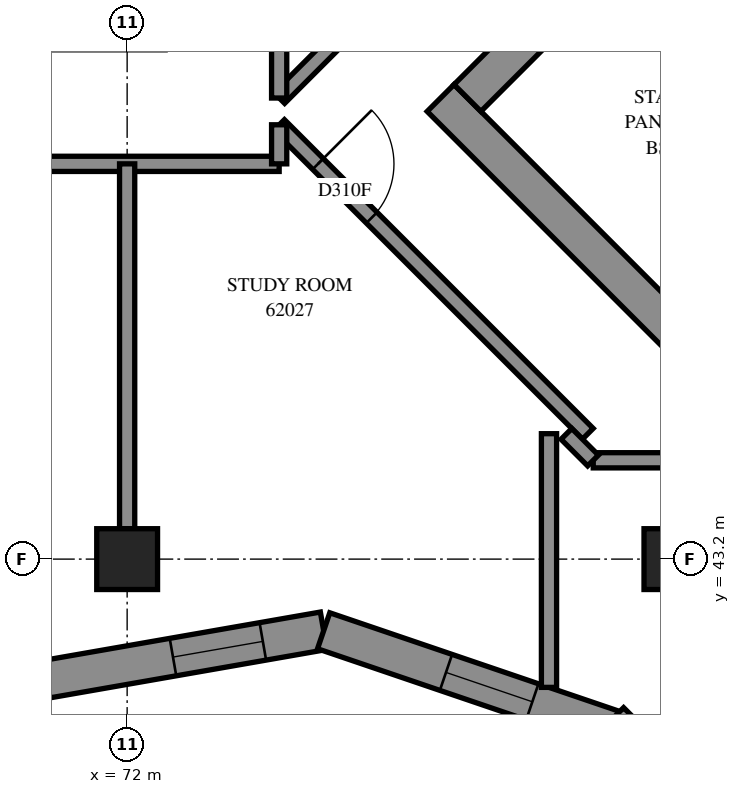
"""IFC4 building model, lengths in metres.
Left out: names, types, materials, properties, quantities, classifications, styles, units other than length and angle.
Written with IfcOpenShell. Run it as: python <this file> out.ifc"""

import sys

from ifc_helpers import new_model, si_unit, direction, frame, frame_2d, origin, origin_2d, place, context, subcontext, project, spatial, polyline, rectangle, outline, extrude, element, fill, save


model = new_model("IFC4")
c1 = context("Model", 3, precision=1e-05, world=origin(), true_north=direction((0.0, 1.0)))
c2 = subcontext(c1, "Body", "Model", "MODEL_VIEW")
j1 = project(units=[si_unit("LENGTHUNIT", "METRE"), si_unit("PLANEANGLEUNIT", "RADIAN")], contexts=[c1])
p1 = place(None, origin())
s1 = spatial("IfcSite", under=j1, at=p1, CompositionType="ELEMENT")
p2 = place(p1, origin())
s2 = spatial("IfcBuilding", under=s1, at=p2, CompositionType="ELEMENT")
p3 = place(p2, frame((0.0, 0.0, 227.0)))
s3 = spatial("IfcBuildingStorey", under=s2, at=p3, CompositionType="ELEMENT", Elevation=227.0)
for number, where, z_axis, x_axis in (
    (1, (72.0, 43.2, 0.0), (0.0, 0.0, 1.0), (1.0, 0.0, 0.0)),
    (2, (79.2, 43.2, 0.0), (0.0, 0.0, 1.0), (1.0, 0.0, 0.0)),
):
    element("IfcColumn", number, at=place(p3, frame(where, z_axis=z_axis, x_axis=x_axis)), inside=s3, PredefinedType="COLUMN", context=c2, shape_type="SweptSolid", body=[
        extrude(rectangle(XDim=0.8, YDim=0.8, at=origin_2d()), origin(), (0.0, 0.0, 1.0), 3.1),
    ])
p4 = place(p3, frame((76.124, 49.267, -0.3), z_axis=(0.0, 0.0, 1.0), x_axis=(0.7071067812, -0.7071067812, 0.0)))
e3 = element("IfcWall", 3, at=p4, inside=s3, PredefinedType="SHEAR", context=c2, shape_type="SweptSolid", body=[
    extrude(rectangle(XDim=15.4, YDim=0.5, at=frame_2d((7.7, 0.0))), origin(), (0.0, 0.0, 1.0), 2.7),
])
p5 = place(p3, frame((76.478, 49.267, -0.3), z_axis=(0.0, 0.0, 1.0), x_axis=(0.7071067812, 0.7071067812, 0.0)))
e4 = element("IfcWall", 4, at=p5, inside=s3, PredefinedType="SHEAR", context=c2, shape_type="SweptSolid", body=[
    extrude(rectangle(XDim=14.4, YDim=0.5, at=frame_2d((7.2, 0.0))), origin(), (0.0, 0.0, 1.0), 2.7),
])
p6 = place(p5, frame((4.55, 0.0, 0.3)))
e5 = element("IfcOpeningElement", 5, at=p6, cuts=e4, PredefinedType="OPENING", context=c2, shape_type="SweptSolid", body=[
    extrude(rectangle(XDim=1.1, YDim=2.1, at=frame_2d((0.55, 1.05))), frame((0.0, 0.26, 0.0), z_axis=(0.0, -1.0, 0.0), x_axis=(1.0, 0.0, 0.0)), (0.0, 0.0, 1.0), 0.52),
])
p7 = place(p5, frame((11.35, 0.0, 0.3)))
e6 = element("IfcOpeningElement", 6, at=p7, cuts=e4, PredefinedType="OPENING", context=c2, shape_type="SweptSolid", body=[
    extrude(rectangle(XDim=1.1, YDim=2.1, at=frame_2d((0.55, 1.05))), frame((0.0, 0.26, 0.0), z_axis=(0.0, -1.0, 0.0), x_axis=(1.0, 0.0, 0.0)), (0.0, 0.0, 1.0), 0.52),
])
p8 = place(p3, frame((78.988, 51.423, 0.0), z_axis=(0.0, 0.0, 1.0), x_axis=(0.7071067812, -0.7071067812, 0.0)))
e7 = element("IfcWall", 7, at=p8, inside=s3, PredefinedType="SOLIDWALL", context=c2, shape_type="SweptSolid", body=[
    extrude(rectangle(XDim=14.4, YDim=0.3, at=frame_2d((7.2, 0.0))), origin(), (0.0, 0.0, 1.0), 3.1),
])
p9 = place(p8, frame((1.35, 0.0, 0.0)))
e8 = element("IfcOpeningElement", 8, at=p9, cuts=e7, PredefinedType="OPENING", context=c2, shape_type="SweptSolid", body=[
    extrude(rectangle(XDim=0.9, YDim=2.1, at=frame_2d((0.45, 1.05))), frame((0.0, 0.16, 0.0), z_axis=(0.0, -1.0, 0.0), x_axis=(1.0, 0.0, 0.0)), (0.0, 0.0, 1.0), 0.32),
])
p10 = place(p8, frame((4.95, 0.0, 0.0)))
e9 = element("IfcOpeningElement", 9, at=p10, cuts=e7, PredefinedType="OPENING", context=c2, shape_type="SweptSolid", body=[
    extrude(rectangle(XDim=0.9, YDim=2.1, at=frame_2d((0.45, 1.05))), frame((0.0, 0.16, 0.0), z_axis=(0.0, -1.0, 0.0), x_axis=(1.0, 0.0, 0.0)), (0.0, 0.0, 1.0), 0.32),
])
p11 = place(p8, frame((8.55, 0.0, 0.0)))
e10 = element("IfcOpeningElement", 10, at=p11, cuts=e7, PredefinedType="OPENING", context=c2, shape_type="SweptSolid", body=[
    extrude(rectangle(XDim=0.9, YDim=2.1, at=frame_2d((0.45, 1.05))), frame((0.0, 0.16, 0.0), z_axis=(0.0, -1.0, 0.0), x_axis=(1.0, 0.0, 0.0)), (0.0, 0.0, 1.0), 0.32),
])
p12 = place(p8, frame((12.05, 0.0, 0.0)))
e11 = element("IfcOpeningElement", 11, at=p12, cuts=e7, PredefinedType="OPENING", context=c2, shape_type="SweptSolid", body=[
    extrude(rectangle(XDim=1.1, YDim=2.1, at=frame_2d((0.55, 1.05))), frame((0.0, 0.16, 0.0), z_axis=(0.0, -1.0, 0.0), x_axis=(1.0, 0.0, 0.0)), (0.0, 0.0, 1.0), 0.32),
])
p13 = place(p3, frame((70.942, 41.621, 0.0), z_axis=(0.0, 0.0, 1.0), x_axis=(0.9850822975, 0.1720838957, 0.0)))
e12 = element("IfcWall", 12, at=p13, inside=s3, PredefinedType="SOLIDWALL", context=c2, shape_type="SweptSolid", body=[
    extrude(outline(polyline([(-0.044, -0.25), (3.635, -0.25), (3.763, 0.25), (0.044, 0.25), (-0.044, -0.25)])), origin(), (0.0, 0.0, 1.0), 3.1),
])
p14 = place(p13, frame((1.687, 0.0, 0.45)))
e13 = element("IfcOpeningElement", 13, at=p14, cuts=e12, PredefinedType="OPENING", context=c2, shape_type="SweptSolid", body=[
    extrude(rectangle(XDim=1.2, YDim=2.5, at=frame_2d((0.6, 1.25))), frame((0.0, 0.26, 0.0), z_axis=(0.0, -1.0, 0.0), x_axis=(1.0, 0.0, 0.0)), (0.0, 0.0, 1.0), 0.52),
])
p15 = place(p3, frame((74.585, 42.257, 0.0), z_axis=(0.0, 0.0, 1.0), x_axis=(0.9466888904, -0.3221492585, 0.0)))
e14 = element("IfcWall", 14, at=p15, inside=s3, PredefinedType="SOLIDWALL", context=c2, shape_type="SweptSolid", body=[
    extrude(outline(polyline([(0.064, -0.25), (3.892, -0.25), (4.166, 0.25), (-0.064, 0.25), (0.064, -0.25)])), origin(), (0.0, 0.0, 1.0), 3.1),
])
p16 = place(p15, frame((1.7, 0.0, 0.45)))
e15 = element("IfcOpeningElement", 15, at=p16, cuts=e14, PredefinedType="OPENING", context=c2, shape_type="SweptSolid", body=[
    extrude(rectangle(XDim=1.2, YDim=2.5, at=frame_2d((0.6, 1.25))), frame((0.0, 0.26, 0.0), z_axis=(0.0, -1.0, 0.0), x_axis=(1.0, 0.0, 0.0)), (0.0, 0.0, 1.0), 0.52),
])
p17 = place(p3, frame((55.6, 48.4, 0.0), z_axis=(0.0, 0.0, 1.0), x_axis=(1.0, 0.0, 0.0)))
e16 = element("IfcWall", 16, at=p17, inside=s3, PredefinedType="PARTITIONING", context=c2, shape_type="SweptSolid", body=[
    extrude(rectangle(XDim=18.4, YDim=0.2, at=frame_2d((9.2, 0.0))), origin(), (0.0, 0.0, 1.0), 3.1),
])
p18 = place(p17, frame((5.862, 0.0, 0.0)))
e17 = element("IfcOpeningElement", 17, at=p18, cuts=e16, PredefinedType="OPENING", context=c2, shape_type="SweptSolid", body=[
    extrude(rectangle(XDim=1.0, YDim=2.1, at=frame_2d((0.5, 1.05))), frame((0.0, 0.11, 0.0), z_axis=(0.0, -1.0, 0.0), x_axis=(1.0, 0.0, 0.0)), (0.0, 0.0, 1.0), 0.22),
])
p19 = place(p17, frame((13.061, 0.0, 0.0)))
e18 = element("IfcOpeningElement", 18, at=p19, cuts=e16, PredefinedType="OPENING", context=c2, shape_type="SweptSolid", body=[
    extrude(rectangle(XDim=0.9, YDim=2.1, at=frame_2d((0.45, 1.05))), frame((0.0, 0.11, 0.0), z_axis=(0.0, -1.0, 0.0), x_axis=(1.0, 0.0, 0.0)), (0.0, 0.0, 1.0), 0.22),
])
p20 = place(p3, frame((73.999, 48.911, 0.0), z_axis=(0.0, 0.0, 1.0), x_axis=(0.7071067812, -0.7071067812, 0.0)))
e19 = element("IfcWall", 19, at=p20, inside=s3, PredefinedType="PARTITIONING", context=c2, shape_type="SweptSolid", body=[
    extrude(rectangle(XDim=5.745, YDim=0.2, at=frame_2d((2.872, 0.0))), origin(), (0.0, 0.0, 1.0), 3.1),
])
p21 = place(p20, frame((0.724, 0.0, 0.0)))
e20 = element("IfcOpeningElement", 20, at=p21, cuts=e19, PredefinedType="OPENING", context=c2, shape_type="SweptSolid", body=[
    extrude(rectangle(XDim=1.0, YDim=2.1, at=frame_2d((0.5, 1.05))), frame((0.0, 0.11, 0.0), z_axis=(0.0, -1.0, 0.0), x_axis=(1.0, 0.0, 0.0)), (0.0, 0.0, 1.0), 0.22),
])
p22 = place(p3, frame((72.0, 43.6, 0.0), z_axis=(0.0, 0.0, 1.0), x_axis=(0.0, 1.0, 0.0)))
e21 = element("IfcWall", 21, at=p22, inside=s3, PredefinedType="PARTITIONING", context=c2, shape_type="SweptSolid", body=[
    extrude(rectangle(XDim=4.8, YDim=0.2, at=frame_2d((2.4, 0.0))), origin(), (0.0, 0.0, 1.0), 3.1),
])
p23 = place(p3, frame((74.001, 49.267, 0.0), z_axis=(0.0, 0.0, 1.0), x_axis=(0.7071067812, 0.7071067812, 0.0)))
e22 = element("IfcWall", 22, at=p23, inside=s3, PredefinedType="PARTITIONING", context=c2, shape_type="SweptSolid", body=[
    extrude(rectangle(XDim=3.581, YDim=0.2, at=frame_2d((1.79, 0.0))), origin(), (0.0, 0.0, 1.0), 3.1),
])
p24 = place(p3, frame((77.55, 41.513, 0.0), z_axis=(0.0, 0.0, 1.0), x_axis=(0.0, 1.0, 0.0)))
e23 = element("IfcWall", 23, at=p24, inside=s3, PredefinedType="PARTITIONING", context=c2, shape_type="SweptSolid", body=[
    extrude(rectangle(XDim=3.337, YDim=0.2, at=frame_2d((1.669, 0.0))), origin(), (0.0, 0.0, 1.0), 3.1),
])
p25 = place(p3, frame((78.478, 41.193, 0.0), z_axis=(0.0, 0.0, 1.0), x_axis=(0.7065934681, -0.7076197219, 0.0)))
e24 = element("IfcWall", 24, at=p25, inside=s3, PredefinedType="PARTITIONING", context=c2, shape_type="SweptSolid", body=[
    extrude(rectangle(XDim=2.826, YDim=0.15, at=frame_2d((1.413, 0.0))), origin(), (0.0, 0.0, 1.0), 3.1),
])
p26 = place(p3, frame((74.0, 49.266, 0.0), z_axis=(0.0, 0.0, 1.0), x_axis=(0.0, 1.0, 0.0)))
e25 = element("IfcWall", 25, at=p26, inside=s3, PredefinedType="PARTITIONING", context=c2, shape_type="SweptSolid", body=[
    extrude(rectangle(XDim=2.534, YDim=0.2, at=frame_2d((1.267, 0.0))), origin(), (0.0, 0.0, 1.0), 3.1),
])
p27 = place(p3, frame((78.132, 44.5, 0.0), z_axis=(0.0, 0.0, 1.0), x_axis=(1.0, 0.0, 0.0)))
e26 = element("IfcWall", 26, at=p27, inside=s3, PredefinedType="PARTITIONING", context=c2, shape_type="SweptSolid", body=[
    extrude(rectangle(XDim=2.292, YDim=0.2, at=frame_2d((1.146, 0.0))), origin(), (0.0, 0.0, 1.0), 3.1),
])
p28 = place(p3, frame((78.833, 40.239, 0.0), z_axis=(0.0, 0.0, 1.0), x_axis=(0.707079832, 0.7071337294, 0.0)))
e27 = element("IfcWall", 27, at=p28, inside=s3, PredefinedType="PARTITIONING", context=c2, shape_type="SweptSolid", body=[
    extrude(rectangle(XDim=1.855, YDim=0.15, at=frame_2d((0.928, 0.0))), origin(), (0.0, 0.0, 1.0), 3.1),
])
p29 = place(p3, frame((74.0, 48.4, 0.0), z_axis=(0.0, 0.0, 1.0), x_axis=(0.0, 1.0, 0.0)))
e28 = element("IfcWall", 28, at=p29, inside=s3, PredefinedType="PARTITIONING", context=c2, shape_type="SweptSolid", body=[
    extrude(rectangle(XDim=0.514, YDim=0.2, at=frame_2d((0.257, 0.0))), origin(), (0.0, 0.0, 1.0), 3.1),
])
p30 = place(p3, frame((77.779, 44.847, 0.0), z_axis=(0.0, 0.0, 1.0), x_axis=(0.7071067812, -0.7071067812, 0.0)))
e29 = element("IfcWall", 29, at=p30, inside=s3, PredefinedType="PARTITIONING", context=c2, shape_type="SweptSolid", body=[
    extrude(rectangle(XDim=0.495, YDim=0.2, at=frame_2d((0.247, 0.0))), origin(), (0.0, 0.0, 1.0), 3.1),
])
p31 = place(p14, origin())
e30 = element("IfcWindow", 30, at=p31, inside=s3, PartitioningType="SINGLE_PANEL", PredefinedType="WINDOW", context=c2, shape_type="SweptSolid", body=[
    extrude(rectangle(XDim=1.2, YDim=2.5, at=frame_2d((0.6, 1.25))), frame((0.0, 0.18, 0.0), z_axis=(0.0, -1.0, 0.0), x_axis=(1.0, 0.0, 0.0)), (0.0, 0.0, 1.0), 0.06),
])
fill(e13, e30)
p32 = place(p16, origin())
e31 = element("IfcWindow", 31, at=p32, inside=s3, PartitioningType="SINGLE_PANEL", PredefinedType="WINDOW", context=c2, shape_type="SweptSolid", body=[
    extrude(rectangle(XDim=1.2, YDim=2.5, at=frame_2d((0.6, 1.25))), frame((0.0, 0.18, 0.0), z_axis=(0.0, -1.0, 0.0), x_axis=(1.0, 0.0, 0.0)), (0.0, 0.0, 1.0), 0.06),
])
fill(e15, e31)
p33 = place(p21, origin())
e32 = element("IfcDoor", 32, at=p33, inside=s3, OperationType="SINGLE_SWING_LEFT", PredefinedType="DOOR", context=c2, shape_type="SweptSolid", body=[
    extrude(rectangle(XDim=1.0, YDim=2.1, at=frame_2d((0.5, 1.05))), frame((0.0, 0.025, 0.0), z_axis=(0.0, -1.0, 0.0), x_axis=(1.0, 0.0, 0.0)), (0.0, 0.0, 1.0), 0.05),
])
fill(e20, e32)
save(model, sys.argv[1])
